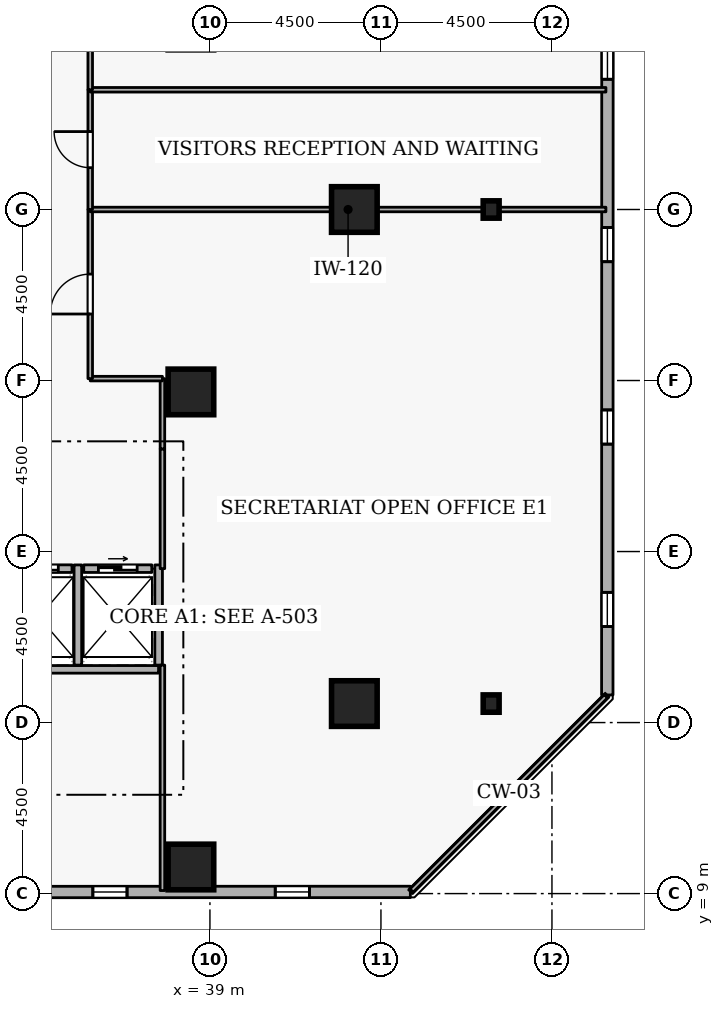
"""IFC4 building model, lengths in metres.
Left out: names, types, materials, properties, quantities, classifications, styles, units other than length and angle.
Written with IfcOpenShell. Run it as: python <this file> out.ifc"""

import sys

from ifc_helpers import new_model, si_unit, direction, frame, frame_2d, origin, origin_2d, place, context, subcontext, project, spatial, rectangle, i_section, extrude, element, fill, save


model = new_model("IFC4")
c1 = context("Model", 3, precision=1e-05, world=origin(), true_north=direction((0.0, 1.0)))
c2 = subcontext(c1, "Body", "Model", "MODEL_VIEW")
j1 = project(units=[si_unit("LENGTHUNIT", "METRE"), si_unit("PLANEANGLEUNIT", "RADIAN")], contexts=[c1])
p1 = place(None, origin())
s1 = spatial("IfcSite", under=j1, at=p1, CompositionType="ELEMENT")
p2 = place(p1, origin())
s2 = spatial("IfcBuilding", under=s1, at=p2, CompositionType="ELEMENT")
p3 = place(p2, frame((0.0, 0.0, 87.3)))
s3 = spatial("IfcBuildingStorey", under=s2, at=p3, CompositionType="ELEMENT", Elevation=87.3)
for number, where, z_axis, x_axis in (
    (1, (38.5, 9.7, 0.0), (0.0, 0.0, 1.0), (1.0, 0.0, 0.0)),
    (2, (42.8, 14.0, 0.0), (0.0, 0.0, 1.0), (1.0, 0.0, 0.0)),
    (3, (42.8, 27.0, 0.0), (0.0, 0.0, 1.0), (1.0, 0.0, 0.0)),
    (4, (38.5, 22.2, 0.0), (0.0, 0.0, 1.0), (1.0, 0.0, 0.0)),
):
    element("IfcColumn", number, at=place(p3, frame(where, z_axis=z_axis, x_axis=x_axis)), inside=s3, PredefinedType="COLUMN", context=c2, shape_type="SweptSolid", body=[
        extrude(rectangle(XDim=1.2, YDim=1.2, at=origin_2d()), origin(), (0.0, 0.0, 1.0), 3.6),
    ])
for number, where, z_axis, x_axis in (
    (5, (46.4, 14.0, 0.0), (0.0, 0.0, 1.0), (1.0, 0.0, 0.0)),
    (6, (46.4, 27.0, 0.0), (0.0, 0.0, 1.0), (1.0, 0.0, 0.0)),
):
    element("IfcColumn", number, at=place(p3, frame(where, z_axis=z_axis, x_axis=x_axis)), inside=s3, PredefinedType="COLUMN", context=c2, shape_type="SweptSolid", body=[
        extrude(i_section(OverallWidth=0.418, OverallDepth=0.456, WebThickness=0.042, FlangeThickness=0.067, FilletRadius=0.015, at=origin_2d()), origin(), (0.0, 0.0, 1.0), 3.6),
    ])
p4 = place(p3, frame((10.119, 9.035, 0.0), z_axis=(0.0, 0.0, 1.0), x_axis=(0.999999970468, 0.000243032466, 0.0)))
e7 = element("IfcWall", 7, at=p4, inside=s3, PredefinedType="STANDARD", context=c2, shape_type="SweptSolid", body=[
    extrude(rectangle(XDim=34.155, YDim=0.3, at=frame_2d((17.078, 0.0))), origin(), (0.0, 0.0, 1.0), 2.7),
])
p5 = place(p4, frame((6.6, 0.0, 0.72)))
e8 = element("IfcOpeningElement", 8, at=p5, cuts=e7, PredefinedType="OPENING", context=c2, shape_type="SweptSolid", body=[
    extrude(rectangle(XDim=0.9, YDim=1.75, at=frame_2d((0.45, 0.875))), frame((0.0, 0.16, 0.0), z_axis=(0.0, -1.0, 0.0), x_axis=(1.0, 0.0, 0.0)), (0.0, 0.0, 1.0), 0.32),
])
p6 = place(p4, frame((11.4, 0.0, 0.72)))
e9 = element("IfcOpeningElement", 9, at=p6, cuts=e7, PredefinedType="OPENING", context=c2, shape_type="SweptSolid", body=[
    extrude(rectangle(XDim=0.9, YDim=1.75, at=frame_2d((0.45, 0.875))), frame((0.0, 0.16, 0.0), z_axis=(0.0, -1.0, 0.0), x_axis=(1.0, 0.0, 0.0)), (0.0, 0.0, 1.0), 0.32),
])
p7 = place(p4, frame((21.0, 0.0, 0.72)))
e10 = element("IfcOpeningElement", 10, at=p7, cuts=e7, PredefinedType="OPENING", context=c2, shape_type="SweptSolid", body=[
    extrude(rectangle(XDim=0.9, YDim=1.75, at=frame_2d((0.45, 0.875))), frame((0.0, 0.16, 0.0), z_axis=(0.0, -1.0, 0.0), x_axis=(1.0, 0.0, 0.0)), (0.0, 0.0, 1.0), 0.32),
])
p8 = place(p4, frame((25.8, 0.0, 0.72)))
e11 = element("IfcOpeningElement", 11, at=p8, cuts=e7, PredefinedType="OPENING", context=c2, shape_type="SweptSolid", body=[
    extrude(rectangle(XDim=0.9, YDim=1.75, at=frame_2d((0.45, 0.875))), frame((0.0, 0.16, 0.0), z_axis=(0.0, -1.0, 0.0), x_axis=(1.0, 0.0, 0.0)), (0.0, 0.0, 1.0), 0.32),
])
p9 = place(p4, frame((30.6, 0.0, 0.72)))
e12 = element("IfcOpeningElement", 12, at=p9, cuts=e7, PredefinedType="OPENING", context=c2, shape_type="SweptSolid", body=[
    extrude(rectangle(XDim=0.9, YDim=1.75, at=frame_2d((0.45, 0.875))), frame((0.0, 0.16, 0.0), z_axis=(0.0, -1.0, 0.0), x_axis=(1.0, 0.0, 0.0)), (0.0, 0.0, 1.0), 0.32),
])
p10 = place(p3, frame((49.456, 14.226, 0.0), z_axis=(0.0, 0.0, 1.0), x_axis=(0.000243032466, 0.999999970468, 0.0)))
e13 = element("IfcWall", 13, at=p10, inside=s3, PredefinedType="STANDARD", context=c2, shape_type="SweptSolid", body=[
    extrude(rectangle(XDim=34.155, YDim=0.3, at=frame_2d((17.078, 0.0))), origin(), (0.0, 0.0, 1.0), 2.7),
])
p11 = place(p10, frame((1.8, 0.0, 0.72)))
e14 = element("IfcOpeningElement", 14, at=p11, cuts=e13, PredefinedType="OPENING", context=c2, shape_type="SweptSolid", body=[
    extrude(rectangle(XDim=0.9, YDim=1.75, at=frame_2d((0.45, 0.875))), frame((0.0, 0.16, 0.0), z_axis=(0.0, -1.0, 0.0), x_axis=(1.0, 0.0, 0.0)), (0.0, 0.0, 1.0), 0.32),
])
p12 = place(p10, frame((6.6, 0.0, 0.72)))
e15 = element("IfcOpeningElement", 15, at=p12, cuts=e13, PredefinedType="OPENING", context=c2, shape_type="SweptSolid", body=[
    extrude(rectangle(XDim=0.9, YDim=1.75, at=frame_2d((0.45, 0.875))), frame((0.0, 0.16, 0.0), z_axis=(0.0, -1.0, 0.0), x_axis=(1.0, 0.0, 0.0)), (0.0, 0.0, 1.0), 0.32),
])
p13 = place(p10, frame((11.4, 0.0, 0.72)))
e16 = element("IfcOpeningElement", 16, at=p13, cuts=e13, PredefinedType="OPENING", context=c2, shape_type="SweptSolid", body=[
    extrude(rectangle(XDim=0.9, YDim=1.75, at=frame_2d((0.45, 0.875))), frame((0.0, 0.16, 0.0), z_axis=(0.0, -1.0, 0.0), x_axis=(1.0, 0.0, 0.0)), (0.0, 0.0, 1.0), 0.32),
])
p14 = place(p10, frame((16.2, 0.0, 0.72)))
e17 = element("IfcOpeningElement", 17, at=p14, cuts=e13, PredefinedType="OPENING", context=c2, shape_type="SweptSolid", body=[
    extrude(rectangle(XDim=0.9, YDim=1.75, at=frame_2d((0.45, 0.875))), frame((0.0, 0.16, 0.0), z_axis=(0.0, -1.0, 0.0), x_axis=(1.0, 0.0, 0.0)), (0.0, 0.0, 1.0), 0.32),
])
p15 = place(p10, frame((21.0, 0.0, 0.72)))
e18 = element("IfcOpeningElement", 18, at=p15, cuts=e13, PredefinedType="OPENING", context=c2, shape_type="SweptSolid", body=[
    extrude(rectangle(XDim=0.9, YDim=1.75, at=frame_2d((0.45, 0.875))), frame((0.0, 0.16, 0.0), z_axis=(0.0, -1.0, 0.0), x_axis=(1.0, 0.0, 0.0)), (0.0, 0.0, 1.0), 0.32),
])
p16 = place(p10, frame((25.8, 0.0, 0.72)))
e19 = element("IfcOpeningElement", 19, at=p16, cuts=e13, PredefinedType="OPENING", context=c2, shape_type="SweptSolid", body=[
    extrude(rectangle(XDim=0.9, YDim=1.75, at=frame_2d((0.45, 0.875))), frame((0.0, 0.16, 0.0), z_axis=(0.0, -1.0, 0.0), x_axis=(1.0, 0.0, 0.0)), (0.0, 0.0, 1.0), 0.32),
])
p17 = place(p10, frame((30.6, 0.0, 0.72)))
e20 = element("IfcOpeningElement", 20, at=p17, cuts=e13, PredefinedType="OPENING", context=c2, shape_type="SweptSolid", body=[
    extrude(rectangle(XDim=0.9, YDim=1.75, at=frame_2d((0.45, 0.875))), frame((0.0, 0.16, 0.0), z_axis=(0.0, -1.0, 0.0), x_axis=(1.0, 0.0, 0.0)), (0.0, 0.0, 1.0), 0.32),
])
p18 = place(p3, frame((33.63, 17.55, 0.0), z_axis=(0.0, 0.0, 1.0), x_axis=(1.0, 0.0, 0.0)))
e21 = element("IfcWall", 21, at=p18, inside=s3, PredefinedType="STANDARD", context=c2, shape_type="SweptSolid", body=[
    extrude(rectangle(XDim=1.74, YDim=0.2, at=frame_2d((0.87, 0.0))), origin(), (0.0, 0.0, 1.0), 3.34),
])
p19 = place(p18, frame((0.36, 0.0, 0.0)))
e22 = element("IfcOpeningElement", 22, at=p19, cuts=e21, PredefinedType="OPENING", context=c2, shape_type="SweptSolid", body=[
    extrude(rectangle(XDim=1.02, YDim=2.06, at=frame_2d((0.51, 1.03))), frame((0.0, 0.11, 0.0), z_axis=(0.0, -1.0, 0.0), x_axis=(1.0, 0.0, 0.0)), (0.0, 0.0, 1.0), 0.22),
])
p20 = place(p3, frame((35.68, 17.55, 0.0), z_axis=(0.0, 0.0, 1.0), x_axis=(1.0, 0.0, 0.0)))
e23 = element("IfcWall", 23, at=p20, inside=s3, PredefinedType="STANDARD", context=c2, shape_type="SweptSolid", body=[
    extrude(rectangle(XDim=1.79, YDim=0.2, at=frame_2d((0.895, 0.0))), origin(), (0.0, 0.0, 1.0), 3.34),
])
p21 = place(p20, frame((0.385, 0.0, 0.0)))
e24 = element("IfcOpeningElement", 24, at=p21, cuts=e23, PredefinedType="OPENING", context=c2, shape_type="SweptSolid", body=[
    extrude(rectangle(XDim=1.02, YDim=2.06, at=frame_2d((0.51, 1.03))), frame((0.0, 0.11, 0.0), z_axis=(0.0, -1.0, 0.0), x_axis=(1.0, 0.0, 0.0)), (0.0, 0.0, 1.0), 0.22),
])
p22 = place(p3, frame((33.452, 14.9, 0.0), z_axis=(0.0, 0.0, 1.0), x_axis=(1.0, 0.0, 0.0)))
e25 = element("IfcWall", 25, at=p22, inside=s3, PredefinedType="STANDARD", context=c2, shape_type="SweptSolid", body=[
    extrude(rectangle(XDim=4.196, YDim=0.2, at=frame_2d((2.098, 0.0))), origin(), (0.0, 0.0, 1.0), 3.34),
])
for number, where, z_axis, x_axis in (
    (26, (35.525, 15.012, 0.0), (0.0, 0.0, 1.0), (0.0, 1.0, 0.0)),
    (27, (37.65, 15.012, 0.0), (0.0, 0.0, 1.0), (0.0, 1.0, 0.0)),
):
    element("IfcWall", number, at=place(p3, frame(where, z_axis=z_axis, x_axis=x_axis)), inside=s3, PredefinedType="STANDARD", context=c2, shape_type="SweptSolid", body=[
        extrude(rectangle(XDim=2.636, YDim=0.2, at=frame_2d((1.318, 0.0))), origin(), (0.0, 0.0, 1.0), 3.34),
    ])
p23 = place(p3, frame((37.75, 17.55, 0.0), z_axis=(0.0, 0.0, 1.0), x_axis=(0.0, 1.0, 0.0)))
e28 = element("IfcWall", 28, at=p23, inside=s3, PredefinedType="PARTITIONING", context=c2, shape_type="SweptSolid", body=[
    extrude(rectangle(XDim=3.15, YDim=0.12, at=frame_2d((1.575, 0.0))), origin(), (0.0, 0.0, 1.0), 3.34),
])
p24 = place(p3, frame((37.75, 20.7, 0.0), z_axis=(0.0, 0.0, 1.0), x_axis=(0.0, 1.0, 0.0)))
e29 = element("IfcWall", 29, at=p24, inside=s3, PredefinedType="PARTITIONING", context=c2, shape_type="SweptSolid", body=[
    extrude(rectangle(XDim=1.85, YDim=0.12, at=frame_2d((0.925, 0.0))), origin(), (0.0, 0.0, 1.0), 3.34),
])
p25 = place(p3, frame((37.75, 22.55, 0.0), z_axis=(0.0, 0.0, 1.0), x_axis=(-1.0, 0.0, 0.0)))
e30 = element("IfcWall", 30, at=p25, inside=s3, PredefinedType="PARTITIONING", context=c2, shape_type="SweptSolid", body=[
    extrude(rectangle(XDim=1.9, YDim=0.12, at=frame_2d((0.95, 0.0))), origin(), (0.0, 0.0, 1.0), 3.34),
])
p26 = place(p3, frame((35.85, 22.55, 0.0), z_axis=(0.0, 0.0, 1.0), x_axis=(0.0, 1.0, 0.0)))
e31 = element("IfcWall", 31, at=p26, inside=s3, PredefinedType="PARTITIONING", context=c2, shape_type="SweptSolid", body=[
    extrude(rectangle(XDim=4.45, YDim=0.12, at=frame_2d((2.225, 0.0))), origin(), (0.0, 0.0, 1.0), 3.34),
])
p27 = place(p26, frame((1.7, 0.0, 0.0)))
e32 = element("IfcOpeningElement", 32, at=p27, cuts=e31, PredefinedType="OPENING", context=c2, shape_type="SweptSolid", body=[
    extrude(rectangle(XDim=1.05, YDim=2.1, at=frame_2d((0.525, 1.05))), frame((0.0, 0.07, 0.0), z_axis=(0.0, -1.0, 0.0), x_axis=(1.0, 0.0, 0.0)), (0.0, 0.0, 1.0), 0.14),
])
p28 = place(p3, frame((35.85, 27.0, 0.0), z_axis=(0.0, 0.0, 1.0), x_axis=(1.0, 0.0, 0.0)))
e33 = element("IfcWall", 33, at=p28, inside=s3, PredefinedType="PARTITIONING", context=c2, shape_type="SweptSolid", body=[
    extrude(rectangle(XDim=13.57, YDim=0.12, at=frame_2d((6.785, 0.0))), origin(), (0.0, 0.0, 1.0), 2.932),
])
p29 = place(p3, frame((49.42, 14.193, 0.0), z_axis=(0.0, 0.0, 1.0), x_axis=(-0.707106781187, -0.707106781187, 0.0)))
e34 = element("IfcWall", 34, at=p29, inside=s3, PredefinedType="PARTITIONING", context=c2, shape_type="SweptSolid", body=[
    extrude(rectangle(XDim=7.23, YDim=0.12, at=frame_2d((3.615, 0.0))), origin(), (0.0, 0.0, 1.0), 3.34),
])
p30 = place(p3, frame((37.75, 9.08, 0.0), z_axis=(0.0, 0.0, 1.0), x_axis=(0.0, 1.0, 0.0)))
e35 = element("IfcWall", 35, at=p30, inside=s3, PredefinedType="PARTITIONING", context=c2, shape_type="SweptSolid", body=[
    extrude(rectangle(XDim=5.932, YDim=0.12, at=frame_2d((2.966, 0.0))), origin(), (0.0, 0.0, 1.0), 3.34),
])
p31 = place(p3, frame((35.85, 27.0, 0.0), z_axis=(0.0, 0.0, 1.0), x_axis=(0.0, 1.0, 0.0)))
e36 = element("IfcWall", 36, at=p31, inside=s3, PredefinedType="PARTITIONING", context=c2, shape_type="SweptSolid", body=[
    extrude(rectangle(XDim=3.15, YDim=0.12, at=frame_2d((1.575, 0.0))), origin(), (0.0, 0.0, 1.0), 3.34),
])
p32 = place(p31, frame((1.1, 0.0, 0.0)))
e37 = element("IfcOpeningElement", 37, at=p32, cuts=e36, PredefinedType="OPENING", context=c2, shape_type="SweptSolid", body=[
    extrude(rectangle(XDim=0.95, YDim=2.1, at=frame_2d((0.475, 1.05))), frame((0.0, 0.07, 0.0), z_axis=(0.0, -1.0, 0.0), x_axis=(1.0, 0.0, 0.0)), (0.0, 0.0, 1.0), 0.14),
])
p33 = place(p3, frame((35.85, 30.15, 0.0), z_axis=(0.0, 0.0, 1.0), x_axis=(1.0, 0.0, 0.0)))
e38 = element("IfcWall", 38, at=p33, inside=s3, PredefinedType="PARTITIONING", context=c2, shape_type="SweptSolid", body=[
    extrude(rectangle(XDim=13.57, YDim=0.12, at=frame_2d((6.785, 0.0))), origin(), (0.0, 0.0, 1.0), 3.34),
])
p34 = place(p3, frame((35.85, 30.15, 0.0), z_axis=(0.0, 0.0, 1.0), x_axis=(0.0, 1.0, 0.0)))
e39 = element("IfcWall", 39, at=p34, inside=s3, PredefinedType="PARTITIONING", context=c2, shape_type="SweptSolid", body=[
    extrude(rectangle(XDim=1.3, YDim=0.12, at=frame_2d((0.65, 0.0))), origin(), (0.0, 0.0, 1.0), 3.34),
])
p35 = place(p8, origin())
e40 = element("IfcWindow", 40, at=p35, inside=s3, PartitioningType="SINGLE_PANEL", PredefinedType="WINDOW", context=c2, shape_type="SweptSolid", body=[
    extrude(rectangle(XDim=0.9, YDim=1.75, at=frame_2d((0.45, 0.875))), frame((0.0, 0.03, 0.0), z_axis=(0.0, -1.0, 0.0), x_axis=(1.0, 0.0, 0.0)), (0.0, 0.0, 1.0), 0.06),
])
fill(e11, e40)
p36 = place(p9, origin())
e41 = element("IfcWindow", 41, at=p36, inside=s3, PartitioningType="SINGLE_PANEL", PredefinedType="WINDOW", context=c2, shape_type="SweptSolid", body=[
    extrude(rectangle(XDim=0.9, YDim=1.75, at=frame_2d((0.45, 0.875))), frame((0.0, 0.03, 0.0), z_axis=(0.0, -1.0, 0.0), x_axis=(1.0, 0.0, 0.0)), (0.0, 0.0, 1.0), 0.06),
])
fill(e12, e41)
p37 = place(p11, origin())
e42 = element("IfcWindow", 42, at=p37, inside=s3, PartitioningType="SINGLE_PANEL", PredefinedType="WINDOW", context=c2, shape_type="SweptSolid", body=[
    extrude(rectangle(XDim=0.9, YDim=1.75, at=frame_2d((0.45, 0.875))), frame((0.0, 0.03, 0.0), z_axis=(0.0, -1.0, 0.0), x_axis=(1.0, 0.0, 0.0)), (0.0, 0.0, 1.0), 0.06),
])
fill(e14, e42)
p38 = place(p12, origin())
e43 = element("IfcWindow", 43, at=p38, inside=s3, PartitioningType="SINGLE_PANEL", PredefinedType="WINDOW", context=c2, shape_type="SweptSolid", body=[
    extrude(rectangle(XDim=0.9, YDim=1.75, at=frame_2d((0.45, 0.875))), frame((0.0, 0.03, 0.0), z_axis=(0.0, -1.0, 0.0), x_axis=(1.0, 0.0, 0.0)), (0.0, 0.0, 1.0), 0.06),
])
fill(e15, e43)
p39 = place(p13, origin())
e44 = element("IfcWindow", 44, at=p39, inside=s3, PartitioningType="SINGLE_PANEL", PredefinedType="WINDOW", context=c2, shape_type="SweptSolid", body=[
    extrude(rectangle(XDim=0.9, YDim=1.75, at=frame_2d((0.45, 0.875))), frame((0.0, 0.03, 0.0), z_axis=(0.0, -1.0, 0.0), x_axis=(1.0, 0.0, 0.0)), (0.0, 0.0, 1.0), 0.06),
])
fill(e16, e44)
p40 = place(p14, origin())
e45 = element("IfcWindow", 45, at=p40, inside=s3, PartitioningType="SINGLE_PANEL", PredefinedType="WINDOW", context=c2, shape_type="SweptSolid", body=[
    extrude(rectangle(XDim=0.9, YDim=1.75, at=frame_2d((0.45, 0.875))), frame((0.0, 0.03, 0.0), z_axis=(0.0, -1.0, 0.0), x_axis=(1.0, 0.0, 0.0)), (0.0, 0.0, 1.0), 0.06),
])
fill(e17, e45)
p41 = place(p19, origin())
e46 = element("IfcDoor", 46, at=p41, inside=s3, OperationType="SLIDING_TO_LEFT", PredefinedType="DOOR", context=c2, shape_type="SweptSolid", body=[
    extrude(rectangle(XDim=1.02, YDim=2.06, at=frame_2d((0.51, 1.03))), frame((0.0, 0.025, 0.0), z_axis=(0.0, -1.0, 0.0), x_axis=(1.0, 0.0, 0.0)), (0.0, 0.0, 1.0), 0.05),
])
fill(e22, e46)
p42 = place(p21, origin())
e47 = element("IfcDoor", 47, at=p42, inside=s3, OperationType="SLIDING_TO_LEFT", PredefinedType="DOOR", context=c2, shape_type="SweptSolid", body=[
    extrude(rectangle(XDim=1.02, YDim=2.06, at=frame_2d((0.51, 1.03))), frame((0.0, 0.025, 0.0), z_axis=(0.0, -1.0, 0.0), x_axis=(1.0, 0.0, 0.0)), (0.0, 0.0, 1.0), 0.05),
])
fill(e24, e47)
p43 = place(p27, origin())
e48 = element("IfcDoor", 48, at=p43, inside=s3, OperationType="SINGLE_SWING_LEFT", PredefinedType="DOOR", context=c2, shape_type="SweptSolid", body=[
    extrude(rectangle(XDim=1.05, YDim=2.1, at=frame_2d((0.525, 1.05))), frame((0.0, 0.025, 0.0), z_axis=(0.0, -1.0, 0.0), x_axis=(1.0, 0.0, 0.0)), (0.0, 0.0, 1.0), 0.05),
])
fill(e32, e48)
p44 = place(p32, origin())
e49 = element("IfcDoor", 49, at=p44, inside=s3, OperationType="SINGLE_SWING_RIGHT", PredefinedType="DOOR", context=c2, shape_type="SweptSolid", body=[
    extrude(rectangle(XDim=0.95, YDim=2.1, at=frame_2d((0.475, 1.05))), frame((0.0, 0.025, 0.0), z_axis=(0.0, -1.0, 0.0), x_axis=(1.0, 0.0, 0.0)), (0.0, 0.0, 1.0), 0.05),
])
fill(e37, e49)
save(model, sys.argv[1])
